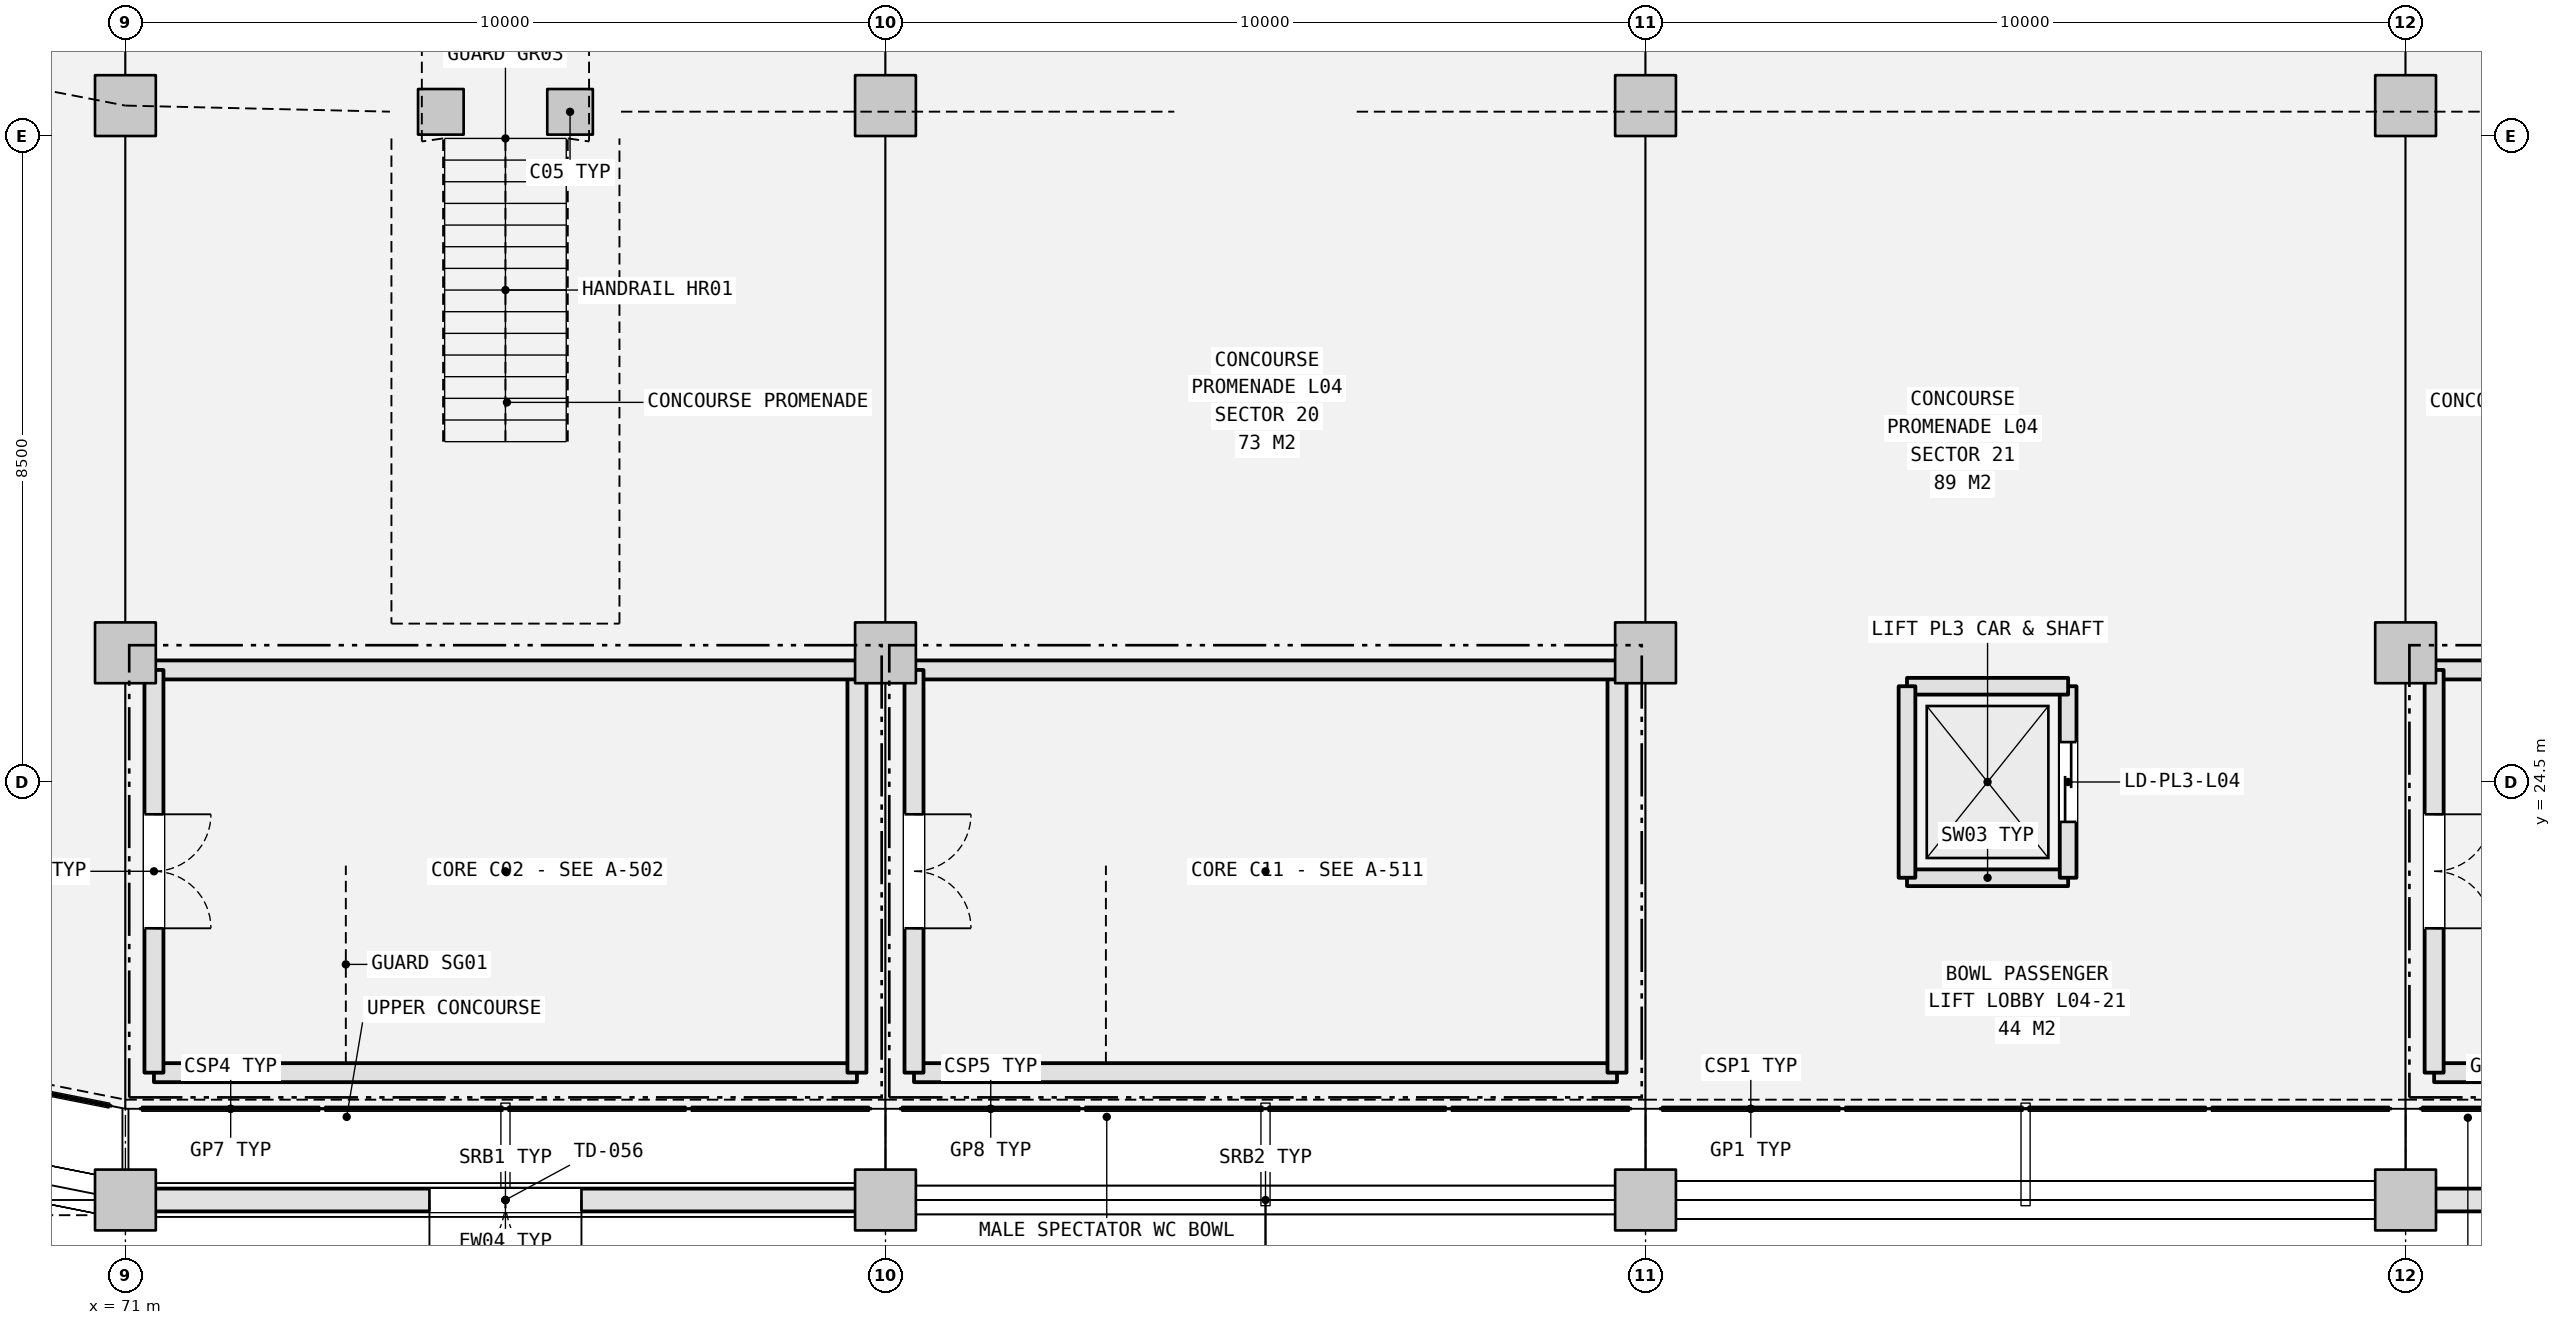
"""IFC4 building model, lengths in metres.
Left out: names, types, materials, properties, quantities, classifications, styles, units other than length and angle.
Written with IfcOpenShell. Run it as: python <this file> out.ifc"""

import sys

from ifc_helpers import new_model, si_unit, direction, frame, frame_2d, origin, origin_2d, place, context, subcontext, project, spatial, rectangle, extrude, element, fill, save


model = new_model("IFC4")
c1 = context("Model", 3, precision=1e-05, world=origin(), true_north=direction((0.0, 1.0)))
c2 = subcontext(c1, "Body", "Model", "MODEL_VIEW")
j1 = project(units=[si_unit("LENGTHUNIT", "METRE"), si_unit("PLANEANGLEUNIT", "RADIAN")], contexts=[c1])
p1 = place(None, origin())
s1 = spatial("IfcSite", under=j1, at=p1, CompositionType="ELEMENT")
p2 = place(p1, origin())
s2 = spatial("IfcBuilding", under=s1, at=p2, CompositionType="ELEMENT")
p3 = place(p2, frame((0.0, 0.0, 21.6)))
s3 = spatial("IfcBuildingStorey", under=s2, at=p3, CompositionType="ELEMENT", Elevation=21.6)
for number, where, z_axis, x_axis in (
    (1, (71.0, 33.4, 0.0), (0.0, 0.0, 1.0), (1.0, 0.0, 0.0)),
    (2, (71.0, 26.2, 0.0), (0.0, 0.0, 1.0), (1.0, 0.0, 0.0)),
    (3, (71.0, 19.0, 0.0), (0.0, 0.0, 1.0), (1.0, 0.0, 0.0)),
    (4, (81.0, 33.4, 0.0), (0.0, 0.0, 1.0), (1.0, 0.0, 0.0)),
    (5, (81.0, 26.2, 0.0), (0.0, 0.0, 1.0), (1.0, 0.0, 0.0)),
    (6, (81.0, 19.0, 0.0), (0.0, 0.0, 1.0), (1.0, 0.0, 0.0)),
    (7, (91.0, 33.4, 0.0), (0.0, 0.0, 1.0), (1.0, 0.0, 0.0)),
    (8, (91.0, 26.2, 0.0), (0.0, 0.0, 1.0), (1.0, 0.0, 0.0)),
    (9, (91.0, 19.0, 0.0), (0.0, 0.0, 1.0), (1.0, 0.0, 0.0)),
    (10, (101.0, 33.4, 0.0), (0.0, 0.0, 1.0), (1.0, 0.0, 0.0)),
    (11, (101.0, 26.2, 0.0), (0.0, 0.0, 1.0), (1.0, 0.0, 0.0)),
    (12, (101.0, 19.0, 0.0), (0.0, 0.0, 1.0), (1.0, 0.0, 0.0)),
):
    element("IfcColumn", number, at=place(p3, frame(where, z_axis=z_axis, x_axis=x_axis)), inside=s3, PredefinedType="COLUMN", context=c2, shape_type="SweptSolid", body=[
        extrude(rectangle(XDim=0.8, YDim=0.8, at=origin_2d()), origin(), (0.0, 0.0, 1.0), 5.4),
    ])
p4 = place(p3, frame((71.388, 19.0, 0.0), z_axis=(0.0, 0.0, 1.0), x_axis=(1.0, 0.0, 0.0)))
e13 = element("IfcWall", 13, at=p4, inside=s3, PredefinedType="SOLIDWALL", context=c2, shape_type="SweptSolid", body=[
    extrude(rectangle(XDim=9.224, YDim=0.3, at=frame_2d((4.612, 0.0))), origin(), (0.0, 0.0, 1.0), 2.772),
])
p5 = place(p4, frame((3.612, 0.0, 0.0)))
e14 = element("IfcOpeningElement", 14, at=p5, cuts=e13, PredefinedType="OPENING", context=c2, shape_type="SweptSolid", body=[
    extrude(rectangle(XDim=2.0, YDim=2.25, at=frame_2d((1.0, 1.125))), frame((0.0, 0.16, 0.0), z_axis=(0.0, -1.0, 0.0), x_axis=(1.0, 0.0, 0.0)), (0.0, 0.0, 1.0), 0.32),
])
p6 = place(p3, frame((101.388, 19.0, 0.0), z_axis=(0.0, 0.0, 1.0), x_axis=(1.0, 0.0, 0.0)))
e15 = element("IfcWall", 15, at=p6, inside=s3, PredefinedType="SOLIDWALL", context=c2, shape_type="SweptSolid", body=[
    extrude(rectangle(XDim=9.224, YDim=0.3, at=frame_2d((4.612, 0.0))), origin(), (0.0, 0.0, 1.0), 2.772),
])
p7 = place(p6, frame((3.612, 0.0, 0.0)))
e16 = element("IfcOpeningElement", 16, at=p7, cuts=e15, PredefinedType="OPENING", context=c2, shape_type="SweptSolid", body=[
    extrude(rectangle(XDim=2.0, YDim=2.25, at=frame_2d((1.0, 1.125))), frame((0.0, 0.16, 0.0), z_axis=(0.0, -1.0, 0.0), x_axis=(1.0, 0.0, 0.0)), (0.0, 0.0, 1.0), 0.32),
])
p8 = place(p3, frame((71.375, 20.675, 0.0), z_axis=(0.0, 0.0, 1.0), x_axis=(1.0, 0.0, 0.0)))
e17 = element("IfcWall", 17, at=p8, inside=s3, PredefinedType="SHEAR", context=c2, shape_type="SweptSolid", body=[
    extrude(rectangle(XDim=9.249, YDim=0.25, at=frame_2d((4.625, 0.0))), origin(), (0.0, 0.0, 1.0), 5.15),
])
p9 = place(p3, frame((80.625, 20.675, 0.0), z_axis=(0.0, 0.0, 1.0), x_axis=(0.0, 1.0, 0.0)))
e18 = element("IfcWall", 18, at=p9, inside=s3, PredefinedType="SHEAR", context=c2, shape_type="SweptSolid", body=[
    extrude(rectangle(XDim=5.299, YDim=0.25, at=frame_2d((2.65, 0.0))), origin(), (0.0, 0.0, 1.0), 5.15),
])
p10 = place(p3, frame((80.625, 25.975, 0.0), z_axis=(0.0, 0.0, 1.0), x_axis=(-1.0, 0.0, 0.0)))
e19 = element("IfcWall", 19, at=p10, inside=s3, PredefinedType="SHEAR", context=c2, shape_type="SweptSolid", body=[
    extrude(rectangle(XDim=9.249, YDim=0.25, at=frame_2d((4.625, 0.0))), origin(), (0.0, 0.0, 1.0), 5.15),
])
p11 = place(p3, frame((71.375, 25.975, 0.0), z_axis=(0.0, 0.0, 1.0), x_axis=(0.0, -1.0, 0.0)))
e20 = element("IfcWall", 20, at=p11, inside=s3, PredefinedType="SHEAR", context=c2, shape_type="SweptSolid", body=[
    extrude(rectangle(XDim=5.299, YDim=0.25, at=frame_2d((2.65, 0.0))), origin(), (0.0, 0.0, 1.0), 5.15),
])
p12 = place(p11, frame((1.9, 0.0, 0.0)))
e21 = element("IfcOpeningElement", 21, at=p12, cuts=e20, PredefinedType="OPENING", context=c2, shape_type="SweptSolid", body=[
    extrude(rectangle(XDim=1.5, YDim=2.2, at=frame_2d((0.75, 1.1))), frame((0.0, 0.135, 0.0), z_axis=(0.0, -1.0, 0.0), x_axis=(1.0, 0.0, 0.0)), (0.0, 0.0, 1.0), 0.27),
])
p13 = place(p3, frame((81.375, 20.675, 0.0), z_axis=(0.0, 0.0, 1.0), x_axis=(1.0, 0.0, 0.0)))
e22 = element("IfcWall", 22, at=p13, inside=s3, PredefinedType="SHEAR", context=c2, shape_type="SweptSolid", body=[
    extrude(rectangle(XDim=9.249, YDim=0.25, at=frame_2d((4.625, 0.0))), origin(), (0.0, 0.0, 1.0), 5.15),
])
p14 = place(p3, frame((90.625, 20.675, 0.0), z_axis=(0.0, 0.0, 1.0), x_axis=(0.0, 1.0, 0.0)))
e23 = element("IfcWall", 23, at=p14, inside=s3, PredefinedType="SHEAR", context=c2, shape_type="SweptSolid", body=[
    extrude(rectangle(XDim=5.299, YDim=0.25, at=frame_2d((2.65, 0.0))), origin(), (0.0, 0.0, 1.0), 5.15),
])
p15 = place(p3, frame((90.625, 25.975, 0.0), z_axis=(0.0, 0.0, 1.0), x_axis=(-1.0, 0.0, 0.0)))
e24 = element("IfcWall", 24, at=p15, inside=s3, PredefinedType="SHEAR", context=c2, shape_type="SweptSolid", body=[
    extrude(rectangle(XDim=9.249, YDim=0.25, at=frame_2d((4.625, 0.0))), origin(), (0.0, 0.0, 1.0), 5.15),
])
p16 = place(p3, frame((81.375, 25.975, 0.0), z_axis=(0.0, 0.0, 1.0), x_axis=(0.0, -1.0, 0.0)))
e25 = element("IfcWall", 25, at=p16, inside=s3, PredefinedType="SHEAR", context=c2, shape_type="SweptSolid", body=[
    extrude(rectangle(XDim=5.299, YDim=0.25, at=frame_2d((2.65, 0.0))), origin(), (0.0, 0.0, 1.0), 5.15),
])
p17 = place(p16, frame((1.9, 0.0, 0.0)))
e26 = element("IfcOpeningElement", 26, at=p17, cuts=e25, PredefinedType="OPENING", context=c2, shape_type="SweptSolid", body=[
    extrude(rectangle(XDim=1.5, YDim=2.2, at=frame_2d((0.75, 1.1))), frame((0.0, 0.135, 0.0), z_axis=(0.0, -1.0, 0.0), x_axis=(1.0, 0.0, 0.0)), (0.0, 0.0, 1.0), 0.27),
])
for number, where, z_axis, x_axis in (
    (27, (101.375, 20.675, 0.0), (0.0, 0.0, 1.0), (1.0, 0.0, 0.0)),
    (28, (110.625, 25.975, 0.0), (0.0, 0.0, 1.0), (-1.0, 0.0, 0.0)),
):
    element("IfcWall", number, at=place(p3, frame(where, z_axis=z_axis, x_axis=x_axis)), inside=s3, PredefinedType="SHEAR", context=c2, shape_type="SweptSolid", body=[
        extrude(rectangle(XDim=9.249, YDim=0.25, at=frame_2d((4.625, 0.0))), origin(), (0.0, 0.0, 1.0), 5.15),
    ])
p18 = place(p3, frame((101.375, 25.975, 0.0), z_axis=(0.0, 0.0, 1.0), x_axis=(0.0, -1.0, 0.0)))
e29 = element("IfcWall", 29, at=p18, inside=s3, PredefinedType="SHEAR", context=c2, shape_type="SweptSolid", body=[
    extrude(rectangle(XDim=5.299, YDim=0.25, at=frame_2d((2.65, 0.0))), origin(), (0.0, 0.0, 1.0), 5.15),
])
p19 = place(p18, frame((1.9, 0.0, 0.0)))
e30 = element("IfcOpeningElement", 30, at=p19, cuts=e29, PredefinedType="OPENING", context=c2, shape_type="SweptSolid", body=[
    extrude(rectangle(XDim=1.5, YDim=2.2, at=frame_2d((0.75, 1.1))), frame((0.0, 0.135, 0.0), z_axis=(0.0, -1.0, 0.0), x_axis=(1.0, 0.0, 0.0)), (0.0, 0.0, 1.0), 0.27),
])
for number, where, z_axis, x_axis in (
    (31, (76.85, 33.318, 0.0), (0.0, 0.0, 1.0), (1.0, 0.0, 0.0)),
    (32, (75.15, 33.318, 0.0), (0.0, 0.0, 1.0), (1.0, 0.0, 0.0)),
):
    element("IfcColumn", number, at=place(p3, frame(where, z_axis=z_axis, x_axis=x_axis)), inside=s3, PredefinedType="COLUMN", context=c2, shape_type="SweptSolid", body=[
        extrude(rectangle(XDim=0.6, YDim=0.6, at=origin_2d()), origin(), (0.0, 0.0, 1.0), 2.494),
    ])
p20 = place(p3, frame((94.44, 23.24, 0.0), z_axis=(0.0, 0.0, 1.0), x_axis=(1.0, 0.0, 0.0)))
e33 = element("IfcWall", 33, at=p20, inside=s3, PredefinedType="SHEAR", context=c2, shape_type="SweptSolid", body=[
    extrude(rectangle(XDim=2.12, YDim=0.22, at=frame_2d((1.06, 0.0))), origin(), (0.0, 0.0, 1.0), 5.15),
])
p21 = place(p3, frame((96.56, 23.24, 0.0), z_axis=(0.0, 0.0, 1.0), x_axis=(0.0, 1.0, 0.0)))
e34 = element("IfcWall", 34, at=p21, inside=s3, PredefinedType="SHEAR", context=c2, shape_type="SweptSolid", body=[
    extrude(rectangle(XDim=2.52, YDim=0.22, at=frame_2d((1.26, 0.0))), origin(), (0.0, 0.0, 1.0), 5.15),
])
p22 = place(p21, frame((0.735, 0.0, 0.0)))
e35 = element("IfcOpeningElement", 35, at=p22, cuts=e34, PredefinedType="OPENING", context=c2, shape_type="SweptSolid", body=[
    extrude(rectangle(XDim=1.05, YDim=2.15, at=frame_2d((0.525, 1.075))), frame((0.0, 0.12, 0.0), z_axis=(0.0, -1.0, 0.0), x_axis=(1.0, 0.0, 0.0)), (0.0, 0.0, 1.0), 0.24),
])
p23 = place(p3, frame((96.56, 25.76, 0.0), z_axis=(0.0, 0.0, 1.0), x_axis=(-1.0, 0.0, 0.0)))
e36 = element("IfcWall", 36, at=p23, inside=s3, PredefinedType="SHEAR", context=c2, shape_type="SweptSolid", body=[
    extrude(rectangle(XDim=2.12, YDim=0.22, at=frame_2d((1.06, 0.0))), origin(), (0.0, 0.0, 1.0), 5.15),
])
p24 = place(p3, frame((94.44, 25.76, 0.0), z_axis=(0.0, 0.0, 1.0), x_axis=(0.0, -1.0, 0.0)))
e37 = element("IfcWall", 37, at=p24, inside=s3, PredefinedType="SHEAR", context=c2, shape_type="SweptSolid", body=[
    extrude(rectangle(XDim=2.52, YDim=0.22, at=frame_2d((1.26, 0.0))), origin(), (0.0, 0.0, 1.0), 5.15),
])
p25 = place(p5, frame((2.0, 0.0, 0.0), z_axis=(0.0, 0.0, 1.0), x_axis=(-1.0, 0.0, 0.0)))
e38 = element("IfcDoor", 38, at=p25, inside=s3, OperationType="DOUBLE_DOOR_SINGLE_SWING", PredefinedType="DOOR", context=c2, shape_type="SweptSolid", body=[
    extrude(rectangle(XDim=2.0, YDim=2.25, at=frame_2d((1.0, 1.125))), frame((0.0, 0.025, 0.0), z_axis=(0.0, -1.0, 0.0), x_axis=(1.0, 0.0, 0.0)), (0.0, 0.0, 1.0), 0.05),
])
fill(e14, e38)
p26 = place(p12, origin())
e39 = element("IfcDoor", 39, at=p26, inside=s3, OperationType="DOUBLE_DOOR_SINGLE_SWING", PredefinedType="DOOR", context=c2, shape_type="SweptSolid", body=[
    extrude(rectangle(XDim=1.5, YDim=2.2, at=frame_2d((0.75, 1.1))), frame((0.0, 0.025, 0.0), z_axis=(0.0, -1.0, 0.0), x_axis=(1.0, 0.0, 0.0)), (0.0, 0.0, 1.0), 0.05),
])
fill(e21, e39)
p27 = place(p17, origin())
e40 = element("IfcDoor", 40, at=p27, inside=s3, OperationType="DOUBLE_DOOR_SINGLE_SWING", PredefinedType="DOOR", context=c2, shape_type="SweptSolid", body=[
    extrude(rectangle(XDim=1.5, YDim=2.2, at=frame_2d((0.75, 1.1))), frame((0.0, 0.025, 0.0), z_axis=(0.0, -1.0, 0.0), x_axis=(1.0, 0.0, 0.0)), (0.0, 0.0, 1.0), 0.05),
])
fill(e26, e40)
p28 = place(p19, origin())
e41 = element("IfcDoor", 41, at=p28, inside=s3, OperationType="DOUBLE_DOOR_SINGLE_SWING", PredefinedType="DOOR", context=c2, shape_type="SweptSolid", body=[
    extrude(rectangle(XDim=1.5, YDim=2.2, at=frame_2d((0.75, 1.1))), frame((0.0, 0.025, 0.0), z_axis=(0.0, -1.0, 0.0), x_axis=(1.0, 0.0, 0.0)), (0.0, 0.0, 1.0), 0.05),
])
fill(e30, e41)
p29 = place(p22, origin())
e42 = element("IfcDoor", 42, at=p29, inside=s3, OperationType="DOUBLE_DOOR_SLIDING", PredefinedType="DOOR", context=c2, shape_type="SweptSolid", body=[
    extrude(rectangle(XDim=1.05, YDim=2.15, at=frame_2d((0.525, 1.075))), frame((0.0, 0.025, 0.0), z_axis=(0.0, -1.0, 0.0), x_axis=(1.0, 0.0, 0.0)), (0.0, 0.0, 1.0), 0.05),
])
fill(e35, e42)
save(model, sys.argv[1])
